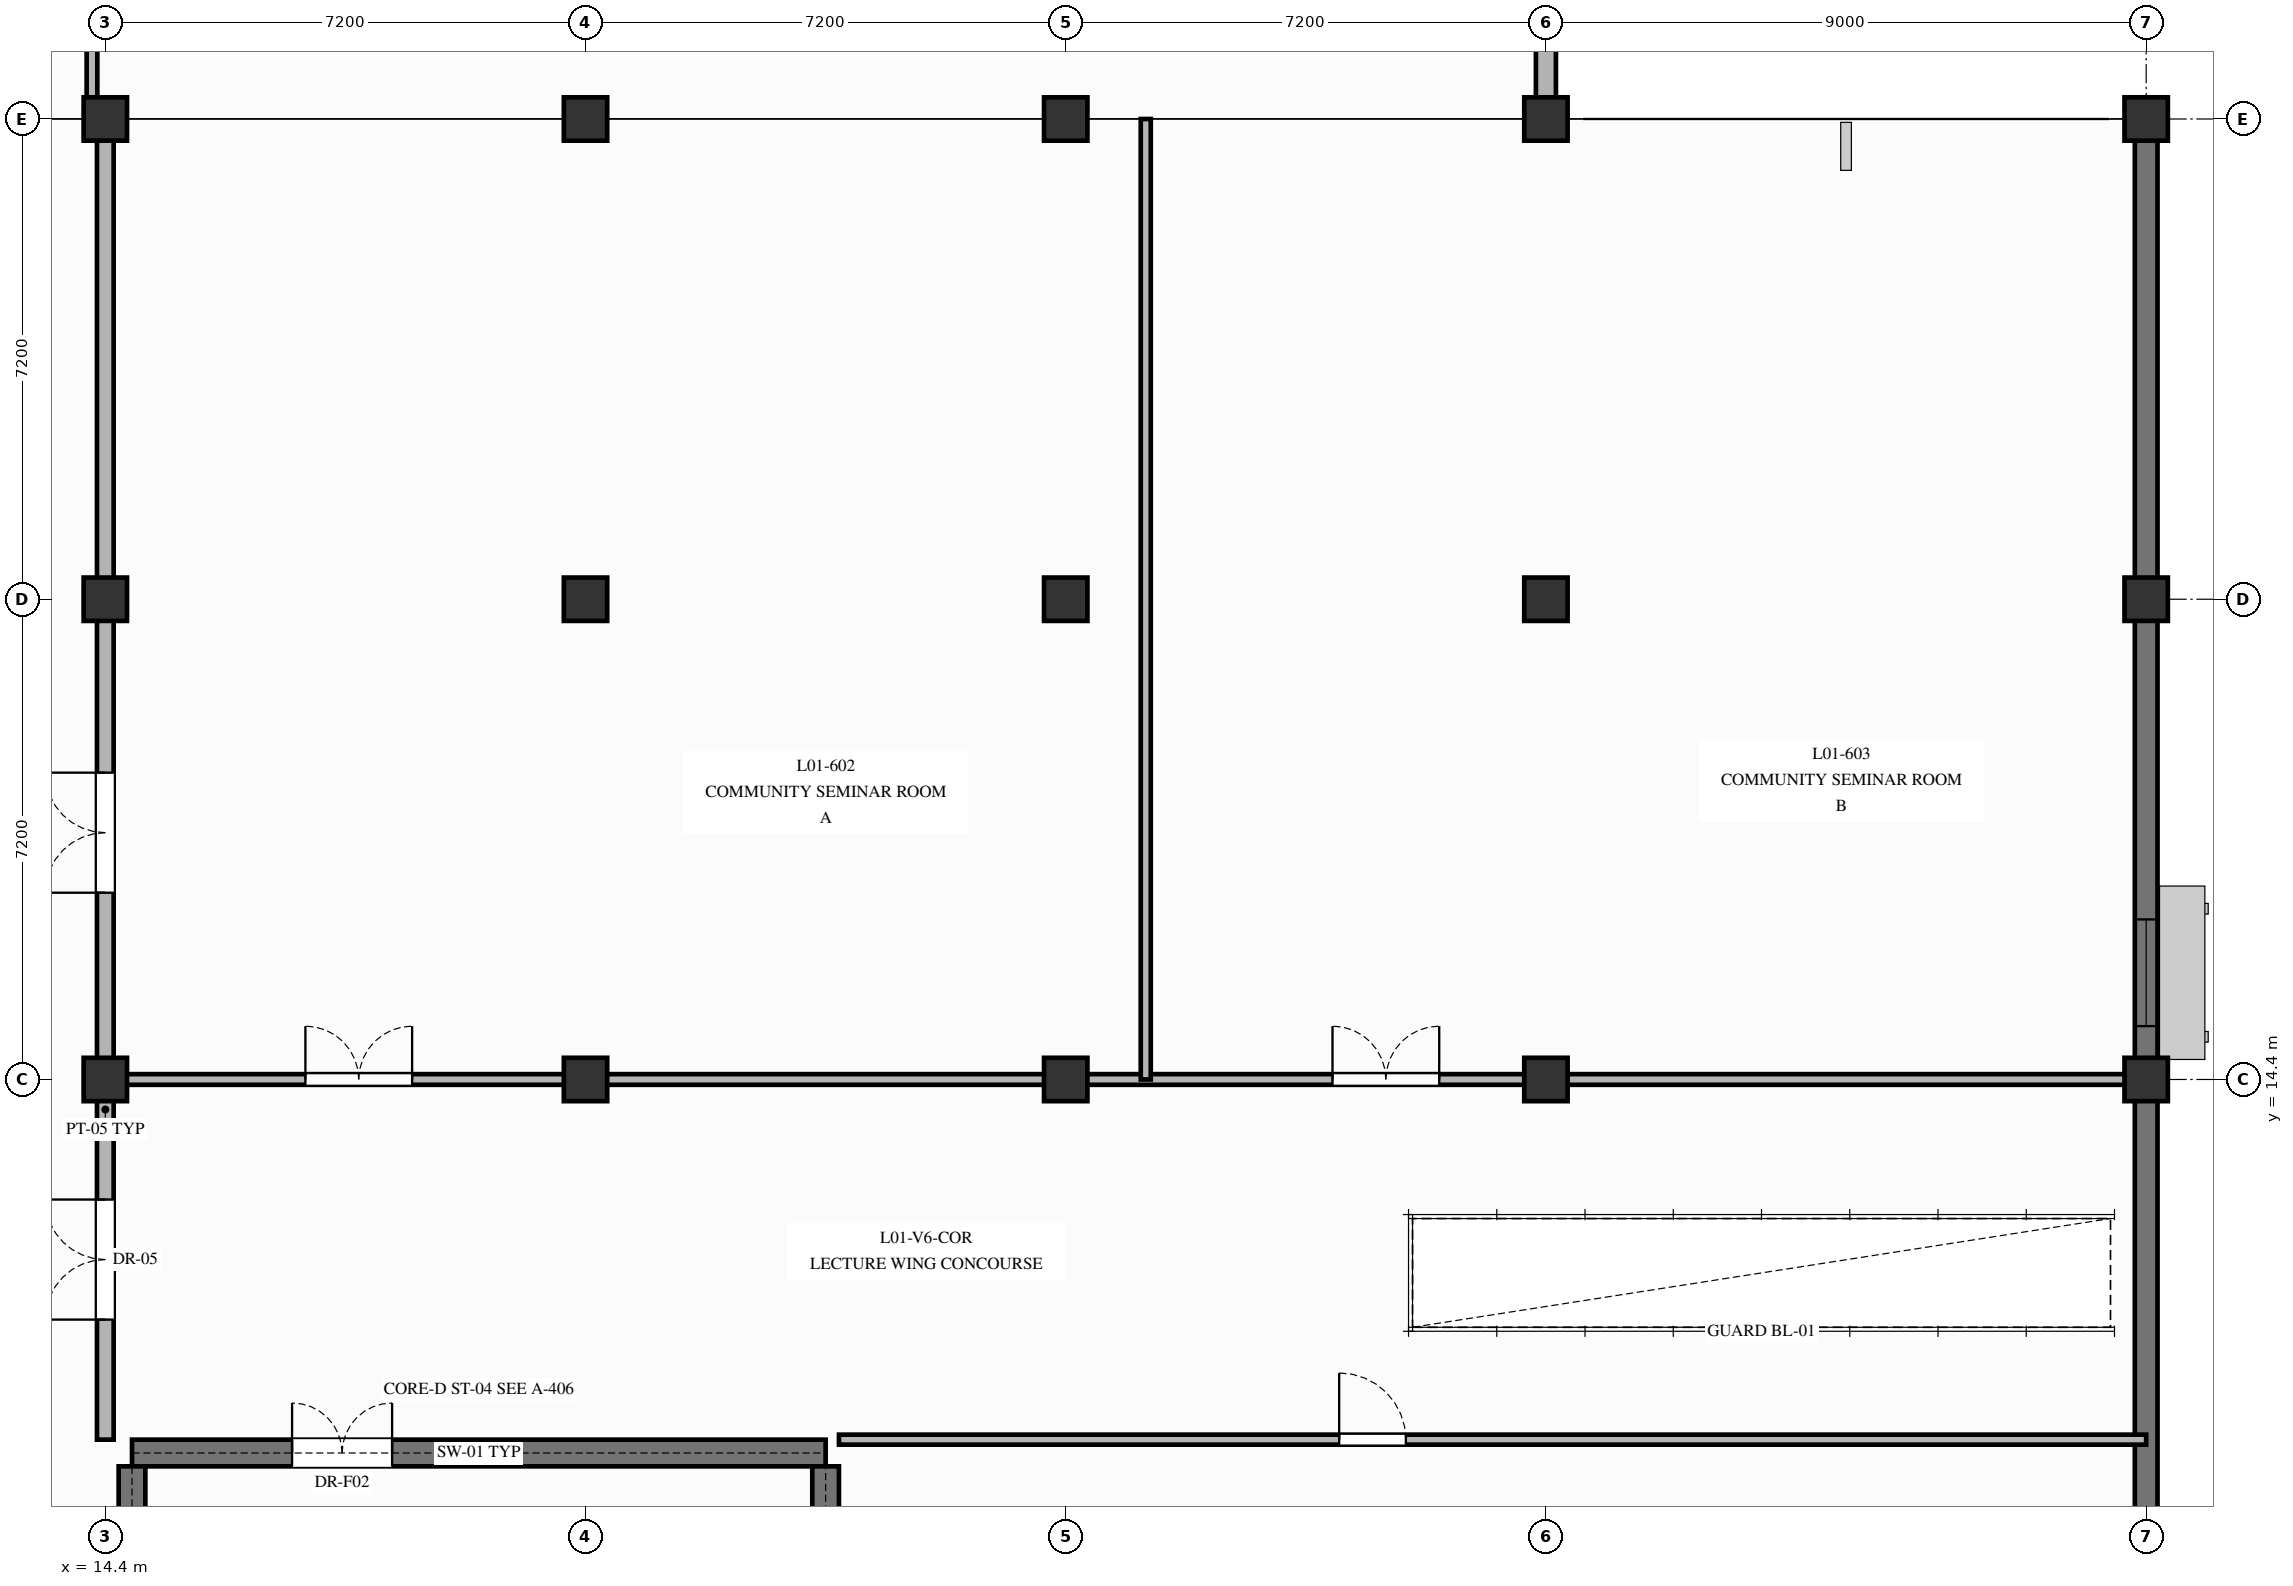
"""IFC4 building model, lengths in metres.
Left out: names, types, materials, properties, quantities, classifications, styles, units other than length and angle.
Written with IfcOpenShell. Run it as: python <this file> out.ifc"""

import sys

from ifc_helpers import new_model, si_unit, direction, frame, frame_2d, origin, origin_2d, place, context, subcontext, project, spatial, rectangle, extrude, element, fill, save


model = new_model("IFC4")
c1 = context("Model", 3, precision=1e-05, world=origin(), true_north=direction((0.0, 1.0)))
c2 = subcontext(c1, "Body", "Model", "MODEL_VIEW")
j1 = project(units=[si_unit("LENGTHUNIT", "METRE"), si_unit("PLANEANGLEUNIT", "RADIAN")], contexts=[c1])
p1 = place(None, origin())
s1 = spatial("IfcSite", under=j1, at=p1, CompositionType="ELEMENT")
p2 = place(p1, origin())
s2 = spatial("IfcBuilding", under=s1, at=p2, CompositionType="ELEMENT")
p3 = place(p2, frame((0.0, 0.0, 5.1)))
s3 = spatial("IfcBuildingStorey", under=s2, at=p3, CompositionType="ELEMENT", Elevation=5.1)
for number, where, z_axis, x_axis in (
    (1, (14.4, 14.4, 0.0), (0.0, 0.0, 1.0), (1.0, 0.0, 0.0)),
    (2, (14.4, 21.6, 0.0), (0.0, 0.0, 1.0), (1.0, 0.0, 0.0)),
    (3, (14.4, 28.8, 0.0), (0.0, 0.0, 1.0), (1.0, 0.0, 0.0)),
    (4, (21.6, 14.4, 0.0), (0.0, 0.0, 1.0), (1.0, 0.0, 0.0)),
    (5, (21.6, 21.6, 0.0), (0.0, 0.0, 1.0), (1.0, 0.0, 0.0)),
    (6, (21.6, 28.8, 0.0), (0.0, 0.0, 1.0), (1.0, 0.0, 0.0)),
    (7, (28.8, 14.4, 0.0), (0.0, 0.0, 1.0), (1.0, 0.0, 0.0)),
    (8, (28.8, 21.6, 0.0), (0.0, 0.0, 1.0), (1.0, 0.0, 0.0)),
    (9, (28.8, 28.8, 0.0), (0.0, 0.0, 1.0), (1.0, 0.0, 0.0)),
    (10, (36.0, 14.4, 0.0), (0.0, 0.0, 1.0), (1.0, 0.0, 0.0)),
    (11, (36.0, 21.6, 0.0), (0.0, 0.0, 1.0), (1.0, 0.0, 0.0)),
    (12, (36.0, 28.8, 0.0), (0.0, 0.0, 1.0), (1.0, 0.0, 0.0)),
    (13, (45.0, 14.4, 0.0), (0.0, 0.0, 1.0), (1.0, 0.0, 0.0)),
    (14, (45.0, 21.6, 0.0), (0.0, 0.0, 1.0), (1.0, 0.0, 0.0)),
    (15, (45.0, 28.8, 0.0), (0.0, 0.0, 1.0), (1.0, 0.0, 0.0)),
):
    element("IfcColumn", number, at=place(p3, frame(where, z_axis=z_axis, x_axis=x_axis)), inside=s3, PredefinedType="COLUMN", context=c2, shape_type="SweptSolid", body=[
        extrude(rectangle(XDim=0.65, YDim=0.65, at=origin_2d()), origin(), (0.0, 0.0, 1.0), 3.84),
    ])
p4 = place(p3, frame((36.0, 28.8, 0.0), z_axis=(0.0, 0.0, 1.0), x_axis=(0.0, 1.0, 0.0)))
e16 = element("IfcWall", 16, at=p4, inside=s3, PredefinedType="SOLIDWALL", context=c2, shape_type="SweptSolid", body=[
    extrude(rectangle(XDim=7.2, YDim=0.3, at=frame_2d((3.6, 0.0))), origin(), (0.0, 0.0, 1.0), 3.117),
])
p5 = place(p4, frame((1.6, 0.0, 0.85)))
e17 = element("IfcOpeningElement", 17, at=p5, cuts=e16, PredefinedType="OPENING", context=c2, shape_type="SweptSolid", body=[
    extrude(rectangle(XDim=1.95, YDim=2.1, at=frame_2d((0.975, 1.05))), frame((0.0, 0.16, 0.0), z_axis=(0.0, -1.0, 0.0), x_axis=(1.0, 0.0, 0.0)), (0.0, 0.0, 1.0), 0.32),
])
p6 = place(p4, frame((4.5, 0.0, 0.85)))
e18 = element("IfcOpeningElement", 18, at=p6, cuts=e16, PredefinedType="OPENING", context=c2, shape_type="SweptSolid", body=[
    extrude(rectangle(XDim=1.6, YDim=2.05, at=frame_2d((0.8, 1.025))), frame((0.0, 0.16, 0.0), z_axis=(0.0, -1.0, 0.0), x_axis=(1.0, 0.0, 0.0)), (0.0, 0.0, 1.0), 0.32),
])
p7 = place(p3, frame((45.0, 0.0, 0.0), z_axis=(0.0, 0.0, 1.0), x_axis=(0.0, 1.0, 0.0)))
e19 = element("IfcWall", 19, at=p7, inside=s3, PredefinedType="SOLIDWALL", context=c2, shape_type="SweptSolid", body=[
    extrude(rectangle(XDim=28.8, YDim=0.34, at=frame_2d((14.4, 0.0))), origin(), (0.0, 0.0, 1.0), 3.55),
])
p8 = place(p7, frame((2.8, 0.0, 0.255)))
e20 = element("IfcOpeningElement", 20, at=p8, cuts=e19, PredefinedType="OPENING", context=c2, shape_type="SweptSolid", body=[
    extrude(rectangle(XDim=2.4, YDim=2.4, at=frame_2d((1.2, 1.2))), frame((0.0, 0.18, 0.0), z_axis=(0.0, -1.0, 0.0), x_axis=(1.0, 0.0, 0.0)), (0.0, 0.0, 1.0), 0.36),
])
p9 = place(p7, frame((15.2, 0.0, 0.605)))
e21 = element("IfcOpeningElement", 21, at=p9, cuts=e19, PredefinedType="OPENING", context=c2, shape_type="SweptSolid", body=[
    extrude(rectangle(XDim=1.6, YDim=2.05, at=frame_2d((0.8, 1.025))), frame((0.0, 0.18, 0.0), z_axis=(0.0, -1.0, 0.0), x_axis=(1.0, 0.0, 0.0)), (0.0, 0.0, 1.0), 0.36),
])
p10 = place(p3, frame((14.8, 8.8, 0.0), z_axis=(0.0, 0.0, 1.0), x_axis=(1.0, 0.0, 0.0)))
e22 = element("IfcWall", 22, at=p10, inside=s3, PredefinedType="SHEAR", context=c2, shape_type="SweptSolid", body=[
    extrude(rectangle(XDim=10.4, YDim=0.4, at=frame_2d((5.2, 0.0))), origin(), (0.0, 0.0, 1.0), 3.55),
])
p11 = place(p10, frame((2.4, 0.0, 0.0)))
e23 = element("IfcOpeningElement", 23, at=p11, cuts=e22, PredefinedType="OPENING", context=c2, shape_type="SweptSolid", body=[
    extrude(rectangle(XDim=1.5, YDim=2.2, at=frame_2d((0.75, 1.1))), frame((0.0, 0.21, 0.0), z_axis=(0.0, -1.0, 0.0), x_axis=(1.0, 0.0, 0.0)), (0.0, 0.0, 1.0), 0.42),
])
for number, where, z_axis, x_axis in (
    (24, (14.8, 0.17, 0.0), (0.0, 0.0, 1.0), (0.0, 1.0, 0.0)),
    (25, (25.2, 0.17, 0.0), (0.0, 0.0, 1.0), (0.0, 1.0, 0.0)),
):
    element("IfcWall", number, at=place(p3, frame(where, z_axis=z_axis, x_axis=x_axis)), inside=s3, PredefinedType="SHEAR", context=c2, shape_type="SweptSolid", body=[
        extrude(rectangle(XDim=8.43, YDim=0.4, at=frame_2d((4.215, 0.0))), origin(), (0.0, 0.0, 1.0), 3.55),
    ])
p12 = place(p3, frame((14.2, 28.8, 0.0), z_axis=(0.0, 0.0, 1.0), x_axis=(0.0, 1.0, 0.0)))
e26 = element("IfcWall", 26, at=p12, inside=s3, PredefinedType="PARTITIONING", context=c2, shape_type="SweptSolid", body=[
    extrude(rectangle(XDim=14.32, YDim=0.16, at=frame_2d((7.16, 0.0))), origin(), (0.0, 0.0, 1.0), 2.943),
])
p13 = place(p12, frame((4.5, 0.0, 0.0)))
e27 = element("IfcOpeningElement", 27, at=p13, cuts=e26, PredefinedType="OPENING", context=c2, shape_type="SweptSolid", body=[
    extrude(rectangle(XDim=1.6, YDim=2.2, at=frame_2d((0.8, 1.1))), frame((0.0, 0.09, 0.0), z_axis=(0.0, -1.0, 0.0), x_axis=(1.0, 0.0, 0.0)), (0.0, 0.0, 1.0), 0.18),
])
p14 = place(p3, frame((14.4, 9.0, 0.0), z_axis=(0.0, 0.0, 1.0), x_axis=(0.0, 1.0, 0.0)))
e28 = element("IfcWall", 28, at=p14, inside=s3, PredefinedType="PARTITIONING", context=c2, shape_type="SweptSolid", body=[
    extrude(rectangle(XDim=19.8, YDim=0.25, at=frame_2d((9.9, 0.0))), origin(), (0.0, 0.0, 1.0), 2.755),
])
p15 = place(p14, frame((1.8, 0.0, 0.0)))
e29 = element("IfcOpeningElement", 29, at=p15, cuts=e28, PredefinedType="OPENING", context=c2, shape_type="SweptSolid", body=[
    extrude(rectangle(XDim=1.8, YDim=2.3, at=frame_2d((0.9, 1.15))), frame((0.0, 0.135, 0.0), z_axis=(0.0, -1.0, 0.0), x_axis=(1.0, 0.0, 0.0)), (0.0, 0.0, 1.0), 0.27),
])
p16 = place(p14, frame((8.2, 0.0, 0.0)))
e30 = element("IfcOpeningElement", 30, at=p16, cuts=e28, PredefinedType="OPENING", context=c2, shape_type="SweptSolid", body=[
    extrude(rectangle(XDim=1.8, YDim=2.3, at=frame_2d((0.9, 1.15))), frame((0.0, 0.135, 0.0), z_axis=(0.0, -1.0, 0.0), x_axis=(1.0, 0.0, 0.0)), (0.0, 0.0, 1.0), 0.27),
])
p17 = place(p3, frame((14.6, 14.4, 0.0), z_axis=(0.0, 0.0, 1.0), x_axis=(1.0, 0.0, 0.0)))
e31 = element("IfcWall", 31, at=p17, inside=s3, PredefinedType="PARTITIONING", context=c2, shape_type="SweptSolid", body=[
    extrude(rectangle(XDim=30.4, YDim=0.16, at=frame_2d((15.2, 0.0))), origin(), (0.0, 0.0, 1.0), 2.675),
])
p18 = place(p17, frame((2.8, 0.0, 0.0)))
e32 = element("IfcOpeningElement", 32, at=p18, cuts=e31, PredefinedType="OPENING", context=c2, shape_type="SweptSolid", body=[
    extrude(rectangle(XDim=1.6, YDim=2.2, at=frame_2d((0.8, 1.1))), frame((0.0, 0.09, 0.0), z_axis=(0.0, -1.0, 0.0), x_axis=(1.0, 0.0, 0.0)), (0.0, 0.0, 1.0), 0.18),
])
p19 = place(p17, frame((18.2, 0.0, 0.0)))
e33 = element("IfcOpeningElement", 33, at=p19, cuts=e31, PredefinedType="OPENING", context=c2, shape_type="SweptSolid", body=[
    extrude(rectangle(XDim=1.6, YDim=2.2, at=frame_2d((0.8, 1.1))), frame((0.0, 0.09, 0.0), z_axis=(0.0, -1.0, 0.0), x_axis=(1.0, 0.0, 0.0)), (0.0, 0.0, 1.0), 0.18),
])
p20 = place(p3, frame((30.0, 14.4, 0.0), z_axis=(0.0, 0.0, 1.0), x_axis=(0.0, 1.0, 0.0)))
e34 = element("IfcWall", 34, at=p20, inside=s3, PredefinedType="PARTITIONING", context=c2, shape_type="SweptSolid", body=[
    extrude(rectangle(XDim=14.4, YDim=0.15, at=frame_2d((7.2, 0.0))), origin(), (0.0, 0.0, 1.0), 3.55),
])
p21 = place(p3, frame((25.4, 9.0, 0.0), z_axis=(0.0, 0.0, 1.0), x_axis=(1.0, 0.0, 0.0)))
e35 = element("IfcWall", 35, at=p21, inside=s3, PredefinedType="PARTITIONING", context=c2, shape_type="SweptSolid", body=[
    extrude(rectangle(XDim=19.6, YDim=0.15, at=frame_2d((9.8, 0.0))), origin(), (0.0, 0.0, 1.0), 3.55),
])
p22 = place(p21, frame((7.5, 0.0, 0.0)))
e36 = element("IfcOpeningElement", 36, at=p22, cuts=e35, PredefinedType="OPENING", context=c2, shape_type="SweptSolid", body=[
    extrude(rectangle(XDim=1.0, YDim=2.15, at=frame_2d((0.5, 1.075))), frame((0.0, 0.085, 0.0), z_axis=(0.0, -1.0, 0.0), x_axis=(1.0, 0.0, 0.0)), (0.0, 0.0, 1.0), 0.17),
])
p23 = place(p9, origin())
e37 = element("IfcWindow", 37, at=p23, inside=s3, PartitioningType="SINGLE_PANEL", PredefinedType="WINDOW", context=c2, shape_type="SweptSolid", body=[
    extrude(rectangle(XDim=1.6, YDim=2.05, at=frame_2d((0.8, 1.025))), frame((0.0, 0.03, 0.0), z_axis=(0.0, -1.0, 0.0), x_axis=(1.0, 0.0, 0.0)), (0.0, 0.0, 1.0), 0.06),
])
fill(e21, e37)
p24 = place(p11, origin())
e38 = element("IfcDoor", 38, at=p24, inside=s3, OperationType="DOUBLE_DOOR_SINGLE_SWING", PredefinedType="DOOR", context=c2, shape_type="SweptSolid", body=[
    extrude(rectangle(XDim=1.5, YDim=2.2, at=frame_2d((0.75, 1.1))), frame((0.0, 0.025, 0.0), z_axis=(0.0, -1.0, 0.0), x_axis=(1.0, 0.0, 0.0)), (0.0, 0.0, 1.0), 0.05),
])
fill(e23, e38)
p25 = place(p15, origin())
e39 = element("IfcDoor", 39, at=p25, inside=s3, OperationType="DOUBLE_DOOR_SINGLE_SWING", PredefinedType="DOOR", context=c2, shape_type="SweptSolid", body=[
    extrude(rectangle(XDim=1.8, YDim=2.3, at=frame_2d((0.9, 1.15))), frame((0.0, 0.025, 0.0), z_axis=(0.0, -1.0, 0.0), x_axis=(1.0, 0.0, 0.0)), (0.0, 0.0, 1.0), 0.05),
])
fill(e29, e39)
p26 = place(p16, origin())
e40 = element("IfcDoor", 40, at=p26, inside=s3, OperationType="DOUBLE_DOOR_SINGLE_SWING", PredefinedType="DOOR", context=c2, shape_type="SweptSolid", body=[
    extrude(rectangle(XDim=1.8, YDim=2.3, at=frame_2d((0.9, 1.15))), frame((0.0, 0.025, 0.0), z_axis=(0.0, -1.0, 0.0), x_axis=(1.0, 0.0, 0.0)), (0.0, 0.0, 1.0), 0.05),
])
fill(e30, e40)
p27 = place(p18, origin())
e41 = element("IfcDoor", 41, at=p27, inside=s3, OperationType="DOUBLE_DOOR_SINGLE_SWING", PredefinedType="DOOR", context=c2, shape_type="SweptSolid", body=[
    extrude(rectangle(XDim=1.6, YDim=2.2, at=frame_2d((0.8, 1.1))), frame((0.0, 0.025, 0.0), z_axis=(0.0, -1.0, 0.0), x_axis=(1.0, 0.0, 0.0)), (0.0, 0.0, 1.0), 0.05),
])
fill(e32, e41)
p28 = place(p19, origin())
e42 = element("IfcDoor", 42, at=p28, inside=s3, OperationType="DOUBLE_DOOR_SINGLE_SWING", PredefinedType="DOOR", context=c2, shape_type="SweptSolid", body=[
    extrude(rectangle(XDim=1.6, YDim=2.2, at=frame_2d((0.8, 1.1))), frame((0.0, 0.025, 0.0), z_axis=(0.0, -1.0, 0.0), x_axis=(1.0, 0.0, 0.0)), (0.0, 0.0, 1.0), 0.05),
])
fill(e33, e42)
p29 = place(p22, origin())
e43 = element("IfcDoor", 43, at=p29, inside=s3, OperationType="SINGLE_SWING_LEFT", PredefinedType="DOOR", context=c2, shape_type="SweptSolid", body=[
    extrude(rectangle(XDim=1.0, YDim=2.15, at=frame_2d((0.5, 1.075))), frame((0.0, 0.025, 0.0), z_axis=(0.0, -1.0, 0.0), x_axis=(1.0, 0.0, 0.0)), (0.0, 0.0, 1.0), 0.05),
])
fill(e36, e43)
save(model, sys.argv[1])
